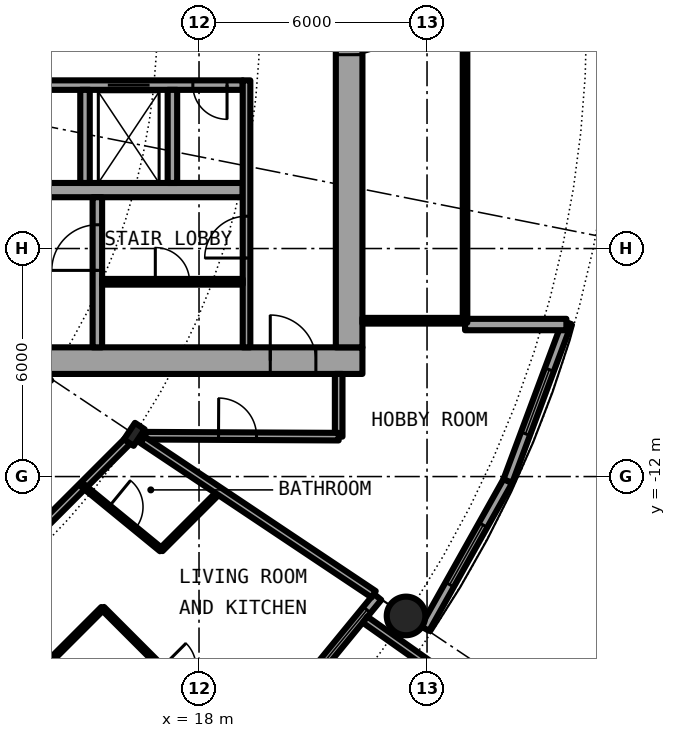
"""IFC4 building model, lengths in metres.
Left out: names, types, materials, properties, quantities, classifications, styles, units other than length and angle.
Written with IfcOpenShell. Run it as: python <this file> out.ifc"""

import sys

from ifc_helpers import new_model, si_unit, direction, frame, frame_2d, origin, origin_2d, place, context, subcontext, project, spatial, rectangle, hollow_circle, i_section, extrude, element, fill, save


model = new_model("IFC4")
c1 = context("Model", 3, precision=1e-05, world=origin(), true_north=direction((0.0, 1.0)))
c2 = subcontext(c1, "Body", "Model", "MODEL_VIEW")
j1 = project(units=[si_unit("LENGTHUNIT", "METRE"), si_unit("PLANEANGLEUNIT", "RADIAN")], contexts=[c1])
p1 = place(None, origin())
s1 = spatial("IfcSite", under=j1, at=p1, CompositionType="ELEMENT")
p2 = place(p1, origin())
s2 = spatial("IfcBuilding", under=s1, at=p2, CompositionType="ELEMENT")
p3 = place(p2, frame((0.0, 0.0, 69.7)))
s3 = spatial("IfcBuildingStorey", under=s2, at=p3, CompositionType="ELEMENT", Elevation=69.7)
p4 = place(p3, frame((23.448, -15.667, 0.0), z_axis=(0.0, 0.0, 1.0), x_axis=(1.0, 0.0, 0.0)))
e1 = element("IfcColumn", 1, at=p4, inside=s3, PredefinedType="COLUMN", context=c2, shape_type="SweptSolid", body=[
    extrude(hollow_circle(Radius=0.508, WallThickness=0.04, at=origin_2d()), origin(), (0.0, 0.0, 1.0), 3.05),
])
p5 = place(p3, frame((16.297, -10.889, 0.0), z_axis=(0.0, 0.0, 1.0), x_axis=(0.831469612303, -0.55557023302, 0.0)))
e2 = element("IfcColumn", 2, at=p5, inside=s3, PredefinedType="COLUMN", context=c2, shape_type="SweptSolid", body=[
    extrude(i_section(OverallWidth=0.306, OverallDepth=0.524, WebThickness=0.021, FlangeThickness=0.04, FilletRadius=0.027, at=origin_2d()), origin(), (0.0, 0.0, 1.0), 3.05),
])
p6 = place(p3, frame((19.304, -19.304, 0.0), z_axis=(0.0, 0.0, 1.0), x_axis=(0.634382322723, 0.773019449054, 0.0)))
e3 = element("IfcWall", 3, at=p6, inside=s3, PredefinedType="SOLIDWALL", context=c2, shape_type="SweptSolid", body=[
    extrude(rectangle(XDim=5.352, YDim=0.25, at=frame_2d((2.676, 0.0))), origin(), (0.0, 0.0, 1.0), 2.7),
])
p7 = place(p6, frame((0.841, 0.0, 0.0)))
e4 = element("IfcOpeningElement", 4, at=p7, cuts=e3, PredefinedType="OPENING", context=c2, shape_type="SweptSolid", body=[
    extrude(rectangle(XDim=1.0, YDim=2.2, at=frame_2d((0.5, 1.1))), frame((0.0, 0.135, 0.0), z_axis=(0.0, -1.0, 0.0), x_axis=(1.0, 0.0, 0.0)), (0.0, 0.0, 1.0), 0.27),
])
p8 = place(p6, frame((3.111, 0.0, 0.3)))
e5 = element("IfcOpeningElement", 5, at=p8, cuts=e3, PredefinedType="OPENING", context=c2, shape_type="SweptSolid", body=[
    extrude(rectangle(XDim=1.8, YDim=2.1, at=frame_2d((0.9, 1.05))), frame((0.0, 0.135, 0.0), z_axis=(0.0, -1.0, 0.0), x_axis=(1.0, 0.0, 0.0)), (0.0, 0.0, 1.0), 0.27),
])
p9 = place(p3, frame((22.37, -15.765, -0.03), z_axis=(0.0, 0.0, 1.0), x_axis=(0.817256123454, -0.576274612209, 0.0)))
e6 = element("IfcWall", 6, at=p9, inside=s3, PredefinedType="SOLIDWALL", context=c2, shape_type="SweptSolid", body=[
    extrude(rectangle(XDim=2.933, YDim=0.2, at=frame_2d((1.466, 0.0))), origin(), (0.0, 0.0, 1.0), 2.73),
])
p10 = place(p3, frame((23.946, -16.0, 0.0), z_axis=(0.0, 0.0, 1.0), x_axis=(0.489696356642, 0.871893042919, 0.0)))
e7 = element("IfcWall", 7, at=p10, inside=s3, PredefinedType="SOLIDWALL", context=c2, shape_type="SweptSolid", body=[
    extrude(rectangle(XDim=4.454, YDim=0.25, at=frame_2d((2.227, 0.0))), origin(), (0.0, 0.0, 1.0), 2.7),
])
p11 = place(p10, frame((1.327, 0.0, 0.3)))
e8 = element("IfcOpeningElement", 8, at=p11, cuts=e7, PredefinedType="OPENING", context=c2, shape_type="SweptSolid", body=[
    extrude(rectangle(XDim=1.8, YDim=2.1, at=frame_2d((0.9, 1.05))), frame((0.0, 0.135, 0.0), z_axis=(0.0, -1.0, 0.0), x_axis=(1.0, 0.0, 0.0)), (0.0, 0.0, 1.0), 0.27),
])
p12 = place(p3, frame((26.127, -12.117, 0.0), z_axis=(0.0, 0.0, 1.0), x_axis=(0.349247811493, 0.937030397675, 0.0)))
e9 = element("IfcWall", 9, at=p12, inside=s3, PredefinedType="SOLIDWALL", context=c2, shape_type="SweptSolid", body=[
    extrude(rectangle(XDim=4.452, YDim=0.25, at=frame_2d((2.226, 0.0))), origin(), (0.0, 0.0, 1.0), 2.7),
])
p13 = place(p12, frame((1.327, 0.0, 0.3)))
e10 = element("IfcOpeningElement", 10, at=p13, cuts=e9, PredefinedType="OPENING", context=c2, shape_type="SweptSolid", body=[
    extrude(rectangle(XDim=1.8, YDim=2.1, at=frame_2d((0.9, 1.05))), frame((0.0, 0.135, 0.0), z_axis=(0.0, -1.0, 0.0), x_axis=(1.0, 0.0, 0.0)), (0.0, 0.0, 1.0), 0.27),
])
p14 = place(p3, frame((25.0, -8.0, 0.0), z_axis=(0.0, 0.0, 1.0), x_axis=(1.0, 0.0, 0.0)))
e11 = element("IfcWall", 11, at=p14, inside=s3, PredefinedType="SOLIDWALL", context=c2, shape_type="SweptSolid", body=[
    extrude(rectangle(XDim=2.667, YDim=0.3, at=frame_2d((1.333, 0.0))), origin(), (0.0, 0.0, 1.0), 2.7),
])
p15 = place(p3, frame((8.3, -8.95, 0.0), z_axis=(0.0, 0.0, 1.0), x_axis=(1.0, 0.0, 0.0)))
e12 = element("IfcWall", 12, at=p15, inside=s3, PredefinedType="SHEAR", context=c2, shape_type="SweptSolid", body=[
    extrude(rectangle(XDim=14.0, YDim=0.7, at=frame_2d((7.0, 0.0))), origin(), (0.0, 0.0, 1.0), 3.05),
])
p16 = place(p15, frame((11.575, 0.0, 0.0)))
e13 = element("IfcOpeningElement", 13, at=p16, cuts=e12, PredefinedType="OPENING", context=c2, shape_type="SweptSolid", body=[
    extrude(rectangle(XDim=1.2, YDim=2.3, at=frame_2d((0.6, 1.15))), frame((0.0, 0.36, 0.0), z_axis=(0.0, -1.0, 0.0), x_axis=(1.0, 0.0, 0.0)), (0.0, 0.0, 1.0), 0.72),
])
p17 = place(p3, frame((21.95, 8.6, 0.0), z_axis=(0.0, 0.0, 1.0), x_axis=(0.0, -1.0, 0.0)))
e14 = element("IfcWall", 14, at=p17, inside=s3, PredefinedType="SHEAR", context=c2, shape_type="SweptSolid", body=[
    extrude(rectangle(XDim=17.2, YDim=0.7, at=frame_2d((8.6, 0.0))), origin(), (0.0, 0.0, 1.0), 3.05),
])
p18 = place(p17, frame((7.7, 0.0, 0.0)))
e15 = element("IfcOpeningElement", 15, at=p18, cuts=e14, PredefinedType="OPENING", context=c2, shape_type="SweptSolid", body=[
    extrude(rectangle(XDim=1.8, YDim=2.3, at=frame_2d((0.9, 1.15))), frame((0.0, 0.36, 0.0), z_axis=(0.0, -1.0, 0.0), x_axis=(1.0, 0.0, 0.0)), (0.0, 0.0, 1.0), 0.72),
])
p19 = place(p3, frame((19.15, -1.7, 0.0), z_axis=(0.0, 0.0, 1.0), x_axis=(-1.0, 0.0, 0.0)))
e16 = element("IfcWall", 16, at=p19, inside=s3, PredefinedType="SHEAR", context=c2, shape_type="SweptSolid", body=[
    extrude(rectangle(XDim=10.15, YDim=0.25, at=frame_2d((5.075, 0.0))), origin(), (0.0, 0.0, 1.0), 3.05),
])
p20 = place(p19, frame((2.45, 0.0, 0.0)))
e17 = element("IfcOpeningElement", 17, at=p20, cuts=e16, PredefinedType="OPENING", context=c2, shape_type="SweptSolid", body=[
    extrude(rectangle(XDim=1.1, YDim=2.3, at=frame_2d((0.55, 1.15))), frame((0.0, 0.135, 0.0), z_axis=(0.0, -1.0, 0.0), x_axis=(1.0, 0.0, 0.0)), (0.0, 0.0, 1.0), 0.27),
])
p21 = place(p19, frame((9.137, 0.0, 0.0)))
e18 = element("IfcOpeningElement", 18, at=p21, cuts=e16, PredefinedType="OPENING", context=c2, shape_type="SweptSolid", body=[
    extrude(rectangle(XDim=0.9, YDim=2.3, at=frame_2d((0.45, 1.15))), frame((0.0, 0.135, 0.0), z_axis=(0.0, -1.0, 0.0), x_axis=(1.0, 0.0, 0.0)), (0.0, 0.0, 1.0), 0.27),
])
p22 = place(p19, frame((7.5, 0.0, 0.0)))
e19 = element("IfcOpeningElement", 19, at=p22, cuts=e16, PredefinedType="OPENING", context=c2, shape_type="SweptSolid", body=[
    extrude(rectangle(XDim=0.9, YDim=2.3, at=frame_2d((0.45, 1.15))), frame((0.0, 0.135, 0.0), z_axis=(0.0, -1.0, 0.0), x_axis=(1.0, 0.0, 0.0)), (0.0, 0.0, 1.0), 0.27),
])
p23 = place(p19, frame((5.125, 0.0, 0.0)))
e20 = element("IfcOpeningElement", 20, at=p23, cuts=e16, PredefinedType="OPENING", context=c2, shape_type="SweptSolid", body=[
    extrude(rectangle(XDim=0.9, YDim=2.3, at=frame_2d((0.45, 1.15))), frame((0.0, 0.135, 0.0), z_axis=(0.0, -1.0, 0.0), x_axis=(1.0, 0.0, 0.0)), (0.0, 0.0, 1.0), 0.27),
])
p24 = place(p19, frame((0.413, 0.0, 0.0)))
e21 = element("IfcOpeningElement", 21, at=p24, cuts=e16, PredefinedType="OPENING", context=c2, shape_type="SweptSolid", body=[
    extrude(rectangle(XDim=0.9, YDim=2.3, at=frame_2d((0.45, 1.15))), frame((0.0, 0.135, 0.0), z_axis=(0.0, -1.0, 0.0), x_axis=(1.0, 0.0, 0.0)), (0.0, 0.0, 1.0), 0.27),
])
p25 = place(p3, frame((9.0, -4.462, 0.0), z_axis=(0.0, 0.0, 1.0), x_axis=(1.0, 0.0, 0.0)))
e22 = element("IfcWall", 22, at=p25, inside=s3, PredefinedType="SHEAR", context=c2, shape_type="SweptSolid", body=[
    extrude(rectangle(XDim=10.15, YDim=0.375, at=frame_2d((5.075, 0.0))), origin(), (0.0, 0.0, 1.0), 3.05),
])
p26 = place(p3, frame((15.325, -8.6, 0.0), z_axis=(0.0, 0.0, 1.0), x_axis=(0.0, 1.0, 0.0)))
e23 = element("IfcWall", 23, at=p26, inside=s3, PredefinedType="SHEAR", context=c2, shape_type="SweptSolid", body=[
    extrude(rectangle(XDim=3.95, YDim=0.25, at=frame_2d((1.975, 0.0))), origin(), (0.0, 0.0, 1.0), 3.05),
])
p27 = place(p26, frame((2.025, 0.0, 0.0)))
e24 = element("IfcOpeningElement", 24, at=p27, cuts=e23, PredefinedType="OPENING", context=c2, shape_type="SweptSolid", body=[
    extrude(rectangle(XDim=1.2, YDim=2.3, at=frame_2d((0.6, 1.15))), frame((0.0, 0.135, 0.0), z_axis=(0.0, -1.0, 0.0), x_axis=(1.0, 0.0, 0.0)), (0.0, 0.0, 1.0), 0.27),
])
for number, where, z_axis, x_axis in (
    (25, (15.0, -1.825, 0.0), (0.0, 0.0, 1.0), (0.0, -1.0, 0.0)),
    (26, (17.3, -1.825, 0.0), (0.0, 0.0, 1.0), (0.0, -1.0, 0.0)),
):
    element("IfcWall", number, at=place(p3, frame(where, z_axis=z_axis, x_axis=x_axis)), inside=s3, PredefinedType="SOLIDWALL", context=c2, shape_type="SweptSolid", body=[
        extrude(rectangle(XDim=2.45, YDim=0.25, at=frame_2d((1.225, 0.0))), origin(), (0.0, 0.0, 1.0), 2.7),
    ])
p28 = place(p3, frame((19.25, -8.6, 0.0), z_axis=(0.0, 0.0, 1.0), x_axis=(0.0, 1.0, 0.0)))
e27 = element("IfcWall", 27, at=p28, inside=s3, PredefinedType="SOLIDWALL", context=c2, shape_type="SweptSolid", body=[
    extrude(rectangle(XDim=7.025, YDim=0.2, at=frame_2d((3.513, 0.0))), origin(), (0.0, 0.0, 1.0), 2.7),
])
p29 = place(p28, frame((2.35, 0.0, 0.0)))
e28 = element("IfcOpeningElement", 28, at=p29, cuts=e27, PredefinedType="OPENING", context=c2, shape_type="SweptSolid", body=[
    extrude(rectangle(XDim=1.1, YDim=2.3, at=frame_2d((0.55, 1.15))), frame((0.0, 0.11, 0.0), z_axis=(0.0, -1.0, 0.0), x_axis=(1.0, 0.0, 0.0)), (0.0, 0.0, 1.0), 0.22),
])
p30 = place(p3, frame((15.45, -6.875, 0.0), z_axis=(0.0, 0.0, 1.0), x_axis=(1.0, 0.0, 0.0)))
e29 = element("IfcWall", 29, at=p30, inside=s3, PredefinedType="PARTITIONING", context=c2, shape_type="SweptSolid", body=[
    extrude(rectangle(XDim=3.7, YDim=0.15, at=frame_2d((1.85, 0.0))), origin(), (0.0, 0.0, 1.0), 2.7),
])
p31 = place(p30, frame((1.4, 0.0, 0.0)))
e30 = element("IfcOpeningElement", 30, at=p31, cuts=e29, PredefinedType="OPENING", context=c2, shape_type="SweptSolid", body=[
    extrude(rectangle(XDim=0.9, YDim=2.3, at=frame_2d((0.45, 1.15))), frame((0.0, 0.085, 0.0), z_axis=(0.0, -1.0, 0.0), x_axis=(1.0, 0.0, 0.0)), (0.0, 0.0, 1.0), 0.17),
])
p32 = place(p3, frame((22.3, -7.9, 0.0), z_axis=(0.0, 0.0, 1.0), x_axis=(1.0, 0.0, 0.0)))
e31 = element("IfcWall", 31, at=p32, inside=s3, PredefinedType="PARTITIONING", context=c2, shape_type="SweptSolid", body=[
    extrude(rectangle(XDim=2.64, YDim=0.15, at=frame_2d((1.32, 0.0))), origin(), (0.0, 0.0, 1.0), 2.7),
])
p33 = place(p3, frame((25.0, -7.95, 0.0), z_axis=(0.0, 0.0, 1.0), x_axis=(0.0, 1.0, 0.0)))
e32 = element("IfcWall", 32, at=p33, inside=s3, PredefinedType="PARTITIONING", context=c2, shape_type="SweptSolid", body=[
    extrude(rectangle(XDim=15.9, YDim=0.12, at=frame_2d((7.95, 0.0))), origin(), (0.0, 0.0, 1.0), 2.7),
])
p34 = place(p33, frame((0.95, 0.0, 0.1)))
e33 = element("IfcOpeningElement", 33, at=p34, cuts=e32, PredefinedType="OPENING", context=c2, shape_type="SweptSolid", body=[
    extrude(rectangle(XDim=14.0, YDim=2.35, at=frame_2d((7.0, 1.175))), frame((0.0, 0.07, 0.0), z_axis=(0.0, -1.0, 0.0), x_axis=(1.0, 0.0, 0.0)), (0.0, 0.0, 1.0), 0.14),
])
p35 = place(p3, frame((12.386, -18.545, 0.0), z_axis=(0.0, 0.0, 1.0), x_axis=(0.707106781187, 0.707106781187, 0.0)))
e34 = element("IfcWall", 34, at=p35, inside=s3, PredefinedType="PARTITIONING", context=c2, shape_type="SweptSolid", body=[
    extrude(rectangle(XDim=4.351, YDim=0.1, at=frame_2d((2.176, 0.0))), origin(), (0.0, 0.0, 1.0), 2.7),
])
p36 = place(p35, frame((0.644, 0.0, 0.0)))
e35 = element("IfcOpeningElement", 35, at=p36, cuts=e34, PredefinedType="OPENING", context=c2, shape_type="SweptSolid", body=[
    extrude(rectangle(XDim=0.9, YDim=2.3, at=frame_2d((0.45, 1.15))), frame((0.0, 0.06, 0.0), z_axis=(0.0, -1.0, 0.0), x_axis=(1.0, 0.0, 0.0)), (0.0, 0.0, 1.0), 0.12),
])
p37 = place(p3, frame((17.004, -13.927, 0.0), z_axis=(0.0, 0.0, 1.0), x_axis=(0.707106781187, 0.707106781187, 0.0)))
e36 = element("IfcWall", 36, at=p37, inside=s3, PredefinedType="PARTITIONING", context=c2, shape_type="SweptSolid", body=[
    extrude(rectangle(XDim=2.175, YDim=0.1, at=frame_2d((1.088, 0.0))), origin(), (0.0, 0.0, 1.0), 2.7),
])
p38 = place(p3, frame((21.675, -10.95, 0.0), z_axis=(0.0, 0.0, 1.0), x_axis=(0.0, 1.0, 0.0)))
e37 = element("IfcWall", 37, at=p38, inside=s3, PredefinedType="PARTITIONING", context=c2, shape_type="SweptSolid", body=[
    extrude(rectangle(XDim=1.65, YDim=0.2, at=frame_2d((0.825, 0.0))), origin(), (0.0, 0.0, 1.0), 2.7),
])
p39 = place(p3, frame((11.0, -16.186, 0.0), z_axis=(0.0, 0.0, 1.0), x_axis=(0.707106781187, 0.707106781187, 0.0)))
e38 = element("IfcWall", 38, at=p39, inside=s3, PredefinedType="PARTITIONING", context=c2, shape_type="SweptSolid", body=[
    extrude(rectangle(XDim=7.334, YDim=0.2, at=frame_2d((3.667, 0.0))), origin(), (0.0, 0.0, 1.0), 2.38),
])
p40 = place(p39, frame((2.211, 0.0, 0.0)))
e39 = element("IfcOpeningElement", 39, at=p40, cuts=e38, PredefinedType="OPENING", context=c2, shape_type="SweptSolid", body=[
    extrude(rectangle(XDim=1.0, YDim=2.3, at=frame_2d((0.5, 1.15))), frame((0.0, 0.11, 0.0), z_axis=(0.0, -1.0, 0.0), x_axis=(1.0, 0.0, 0.0)), (0.0, 0.0, 1.0), 0.22),
])
p41 = place(p3, frame((16.588, -10.925, 0.0), z_axis=(0.0, 0.0, 1.0), x_axis=(0.999988019025, -0.004895079807, 0.0)))
e40 = element("IfcWall", 40, at=p41, inside=s3, PredefinedType="PARTITIONING", context=c2, shape_type="SweptSolid", body=[
    extrude(rectangle(XDim=5.087, YDim=0.2, at=frame_2d((2.543, 0.0))), origin(), (0.0, 0.0, 1.0), 2.7),
])
p42 = place(p41, frame((1.925, 0.0, 0.0)))
e41 = element("IfcOpeningElement", 41, at=p42, cuts=e40, PredefinedType="OPENING", context=c2, shape_type="SweptSolid", body=[
    extrude(rectangle(XDim=1.0, YDim=2.3, at=frame_2d((0.5, 1.15))), frame((0.0, 0.11, 0.0), z_axis=(0.0, -1.0, 0.0), x_axis=(1.0, 0.0, 0.0)), (0.0, 0.0, 1.0), 0.22),
])
p43 = place(p3, frame((11.034, -16.515, 0.0), z_axis=(0.0, 0.0, 1.0), x_axis=(0.555701298605, -0.831382022135, 0.0)))
e42 = element("IfcWall", 42, at=p43, inside=s3, PredefinedType="PARTITIONING", context=c2, shape_type="SweptSolid", body=[
    extrude(rectangle(XDim=7.313, YDim=0.2, at=frame_2d((3.657, 0.0))), origin(), (0.0, 0.0, 1.0), 2.7),
])
p44 = place(p3, frame((14.945, -12.241, 0.0), z_axis=(0.0, 0.0, 1.0), x_axis=(0.77367517848, -0.633582447834, 0.0)))
e43 = element("IfcWall", 43, at=p44, inside=s3, PredefinedType="PARTITIONING", context=c2, shape_type="SweptSolid", body=[
    extrude(rectangle(XDim=2.661, YDim=0.1, at=frame_2d((1.331, 0.0))), origin(), (0.0, 0.0, 1.0), 2.7),
])
p45 = place(p44, frame((0.881, 0.0, 0.0)))
e44 = element("IfcOpeningElement", 44, at=p45, cuts=e43, PredefinedType="OPENING", context=c2, shape_type="SweptSolid", body=[
    extrude(rectangle(XDim=0.9, YDim=2.3, at=frame_2d((0.45, 1.15))), frame((0.0, 0.06, 0.0), z_axis=(0.0, -1.0, 0.0), x_axis=(1.0, 0.0, 0.0)), (0.0, 0.0, 1.0), 0.12),
])
p46 = place(p3, frame((15.465, -15.465, 0.0), z_axis=(0.0, 0.0, 1.0), x_axis=(0.707106781187, -0.707106781187, 0.0)))
e45 = element("IfcWall", 45, at=p46, inside=s3, PredefinedType="PARTITIONING", context=c2, shape_type="SweptSolid", body=[
    extrude(rectangle(XDim=5.305, YDim=0.1, at=frame_2d((2.652, 0.0))), origin(), (0.0, 0.0, 1.0), 2.7),
])
p47 = place(p46, frame((2.202, 0.0, 0.0)))
e46 = element("IfcOpeningElement", 46, at=p47, cuts=e45, PredefinedType="OPENING", context=c2, shape_type="SweptSolid", body=[
    extrude(rectangle(XDim=0.9, YDim=2.3, at=frame_2d((0.45, 1.15))), frame((0.0, 0.06, 0.0), z_axis=(0.0, -1.0, 0.0), x_axis=(1.0, 0.0, 0.0)), (0.0, 0.0, 1.0), 0.12),
])
p48 = place(p3, frame((16.515, -11.035, 0.0), z_axis=(0.0, 0.0, 1.0), x_axis=(0.831505405283, -0.555516661303, 0.0)))
e47 = element("IfcWall", 47, at=p48, inside=s3, PredefinedType="PARTITIONING", context=c2, shape_type="SweptSolid", body=[
    extrude(rectangle(XDim=7.312, YDim=0.2, at=frame_2d((3.656, 0.0))), origin(), (0.0, 0.0, 1.0), 2.7),
])
p49 = place(p8, origin())
e48 = element("IfcWindow", 48, at=p49, inside=s3, PartitioningType="SINGLE_PANEL", PredefinedType="WINDOW", context=c2, shape_type="SweptSolid", body=[
    extrude(rectangle(XDim=1.8, YDim=2.1, at=frame_2d((0.9, 1.05))), frame((0.0, 0.03, 0.0), z_axis=(0.0, -1.0, 0.0), x_axis=(1.0, 0.0, 0.0)), (0.0, 0.0, 1.0), 0.06),
])
fill(e5, e48)
p50 = place(p11, origin())
e49 = element("IfcWindow", 49, at=p50, inside=s3, PartitioningType="SINGLE_PANEL", PredefinedType="WINDOW", context=c2, shape_type="SweptSolid", body=[
    extrude(rectangle(XDim=1.8, YDim=2.1, at=frame_2d((0.9, 1.05))), frame((0.0, 0.03, 0.0), z_axis=(0.0, -1.0, 0.0), x_axis=(1.0, 0.0, 0.0)), (0.0, 0.0, 1.0), 0.06),
])
fill(e8, e49)
p51 = place(p13, origin())
e50 = element("IfcWindow", 50, at=p51, inside=s3, PartitioningType="SINGLE_PANEL", PredefinedType="WINDOW", context=c2, shape_type="SweptSolid", body=[
    extrude(rectangle(XDim=1.8, YDim=2.1, at=frame_2d((0.9, 1.05))), frame((0.0, 0.03, 0.0), z_axis=(0.0, -1.0, 0.0), x_axis=(1.0, 0.0, 0.0)), (0.0, 0.0, 1.0), 0.06),
])
fill(e10, e50)
p52 = place(p20, origin())
e51 = element("IfcDoor", 51, at=p52, inside=s3, OperationType="DOUBLE_DOOR_SLIDING", PredefinedType="DOOR", context=c2, shape_type="SweptSolid", body=[
    extrude(rectangle(XDim=1.1, YDim=2.3, at=frame_2d((0.55, 1.15))), frame((0.0, 0.025, 0.0), z_axis=(0.0, -1.0, 0.0), x_axis=(1.0, 0.0, 0.0)), (0.0, 0.0, 1.0), 0.05),
])
fill(e17, e51)
p53 = place(p24, origin())
e52 = element("IfcDoor", 52, at=p53, inside=s3, OperationType="SINGLE_SWING_RIGHT", PredefinedType="DOOR", context=c2, shape_type="SweptSolid", body=[
    extrude(rectangle(XDim=0.9, YDim=2.3, at=frame_2d((0.45, 1.15))), frame((0.0, 0.025, 0.0), z_axis=(0.0, -1.0, 0.0), x_axis=(1.0, 0.0, 0.0)), (0.0, 0.0, 1.0), 0.05),
])
fill(e21, e52)
p54 = place(p31, origin())
e53 = element("IfcDoor", 53, at=p54, inside=s3, OperationType="SINGLE_SWING_LEFT", PredefinedType="DOOR", context=c2, shape_type="SweptSolid", body=[
    extrude(rectangle(XDim=0.9, YDim=2.3, at=frame_2d((0.45, 1.15))), frame((0.0, 0.025, 0.0), z_axis=(0.0, -1.0, 0.0), x_axis=(1.0, 0.0, 0.0)), (0.0, 0.0, 1.0), 0.05),
])
fill(e30, e53)
p55 = place(p27, origin())
e54 = element("IfcDoor", 54, at=p55, inside=s3, OperationType="SINGLE_SWING_LEFT", PredefinedType="DOOR", context=c2, shape_type="SweptSolid", body=[
    extrude(rectangle(XDim=1.2, YDim=2.3, at=frame_2d((0.6, 1.15))), frame((0.0, 0.025, 0.0), z_axis=(0.0, -1.0, 0.0), x_axis=(1.0, 0.0, 0.0)), (0.0, 0.0, 1.0), 0.05),
])
fill(e24, e54)
p56 = place(p29, origin())
e55 = element("IfcDoor", 55, at=p56, inside=s3, OperationType="SINGLE_SWING_RIGHT", PredefinedType="DOOR", context=c2, shape_type="SweptSolid", body=[
    extrude(rectangle(XDim=1.1, YDim=2.3, at=frame_2d((0.55, 1.15))), frame((0.0, 0.025, 0.0), z_axis=(0.0, -1.0, 0.0), x_axis=(1.0, 0.0, 0.0)), (0.0, 0.0, 1.0), 0.05),
])
fill(e28, e55)
p57 = place(p16, origin())
e56 = element("IfcDoor", 56, at=p57, inside=s3, OperationType="SINGLE_SWING_LEFT", PredefinedType="DOOR", context=c2, shape_type="SweptSolid", body=[
    extrude(rectangle(XDim=1.2, YDim=2.3, at=frame_2d((0.6, 1.15))), frame((0.0, 0.025, 0.0), z_axis=(0.0, -1.0, 0.0), x_axis=(1.0, 0.0, 0.0)), (0.0, 0.0, 1.0), 0.05),
])
fill(e13, e56)
p58 = place(p18, origin())
e57 = element("IfcDoor", 57, at=p58, inside=s3, OperationType="SINGLE_SWING_LEFT", PredefinedType="DOOR", context=c2, shape_type="SweptSolid", body=[
    extrude(rectangle(XDim=1.8, YDim=2.3, at=frame_2d((0.9, 1.15))), frame((0.0, 0.025, 0.0), z_axis=(0.0, -1.0, 0.0), x_axis=(1.0, 0.0, 0.0)), (0.0, 0.0, 1.0), 0.05),
])
fill(e15, e57)
p59 = place(p34, origin())
e58 = element("IfcWindow", 58, at=p59, inside=s3, PartitioningType="SINGLE_PANEL", PredefinedType="WINDOW", context=c2, shape_type="SweptSolid", body=[
    extrude(rectangle(XDim=14.0, YDim=2.35, at=frame_2d((7.0, 1.175))), frame((0.0, 0.03, 0.0), z_axis=(0.0, -1.0, 0.0), x_axis=(1.0, 0.0, 0.0)), (0.0, 0.0, 1.0), 0.06),
])
fill(e33, e58)
p60 = place(p45, origin())
e59 = element("IfcDoor", 59, at=p60, inside=s3, OperationType="SINGLE_SWING_LEFT", PredefinedType="DOOR", context=c2, shape_type="SweptSolid", body=[
    extrude(rectangle(XDim=0.9, YDim=2.3, at=frame_2d((0.45, 1.15))), frame((0.0, 0.025, 0.0), z_axis=(0.0, -1.0, 0.0), x_axis=(1.0, 0.0, 0.0)), (0.0, 0.0, 1.0), 0.05),
])
fill(e44, e59)
p61 = place(p42, origin())
e60 = element("IfcDoor", 60, at=p61, inside=s3, OperationType="SINGLE_SWING_LEFT", PredefinedType="DOOR", context=c2, shape_type="SweptSolid", body=[
    extrude(rectangle(XDim=1.0, YDim=2.3, at=frame_2d((0.5, 1.15))), frame((0.0, 0.025, 0.0), z_axis=(0.0, -1.0, 0.0), x_axis=(1.0, 0.0, 0.0)), (0.0, 0.0, 1.0), 0.05),
])
fill(e41, e60)
save(model, sys.argv[1])
